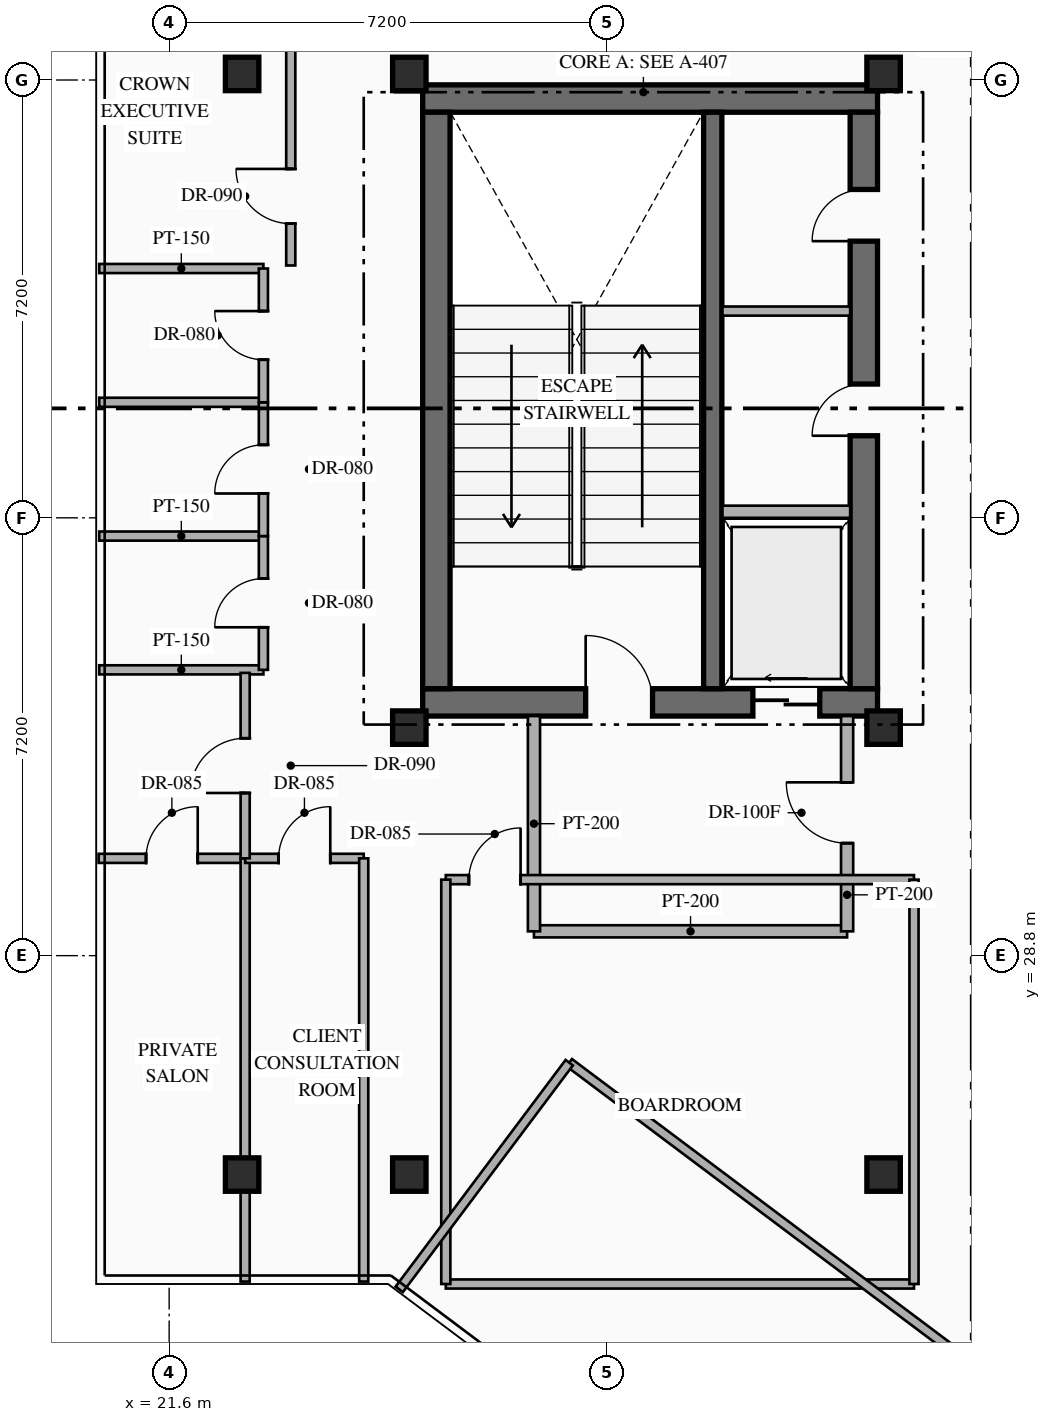
"""IFC4 building model, lengths in metres.
Left out: names, types, materials, properties, quantities, classifications, styles, units other than length and angle.
Written with IfcOpenShell. Run it as: python <this file> out.ifc"""

import sys

from ifc_helpers import new_model, si_unit, direction, frame, frame_2d, origin, origin_2d, place, context, subcontext, project, spatial, rectangle, hollow_rectangle, extrude, element, fill, save


model = new_model("IFC4")
c1 = context("Model", 3, precision=1e-05, world=origin(), true_north=direction((0.0, 1.0)))
c2 = subcontext(c1, "Body", "Model", "MODEL_VIEW")
j1 = project(units=[si_unit("LENGTHUNIT", "METRE"), si_unit("PLANEANGLEUNIT", "RADIAN")], contexts=[c1])
p1 = place(None, origin())
s1 = spatial("IfcSite", under=j1, at=p1, CompositionType="ELEMENT")
p2 = place(p1, origin())
s2 = spatial("IfcBuilding", under=s1, at=p2, CompositionType="ELEMENT")
p3 = place(p2, frame((0.0, 0.0, 281.95)))
s3 = spatial("IfcBuildingStorey", under=s2, at=p3, CompositionType="ELEMENT", Elevation=281.95)
p4 = place(p3, frame((25.77, 32.965, 0.0), z_axis=(0.0, 0.0, 1.0), x_axis=(1.0, 0.0, 0.0)))
e1 = element("IfcWall", 1, at=p4, inside=s3, PredefinedType="SHEAR", context=c2, shape_type="SweptSolid", body=[
    extrude(rectangle(XDim=7.48, YDim=0.45, at=frame_2d((3.74, 0.0))), origin(), (0.0, 0.0, 1.0), 4.0),
])
p5 = place(p4, frame((2.68, 0.0, 0.0)))
e2 = element("IfcOpeningElement", 2, at=p5, cuts=e1, PredefinedType="OPENING", context=c2, shape_type="SweptSolid", body=[
    extrude(rectangle(XDim=1.1, YDim=2.2, at=frame_2d((0.55, 1.1))), frame((0.0, 0.235, 0.0), z_axis=(0.0, -1.0, 0.0), x_axis=(1.0, 0.0, 0.0)), (0.0, 0.0, 1.0), 0.47),
])
p6 = place(p4, frame((5.43, 0.0, 0.0)))
e3 = element("IfcOpeningElement", 3, at=p6, cuts=e1, PredefinedType="OPENING", context=c2, shape_type="SweptSolid", body=[
    extrude(rectangle(XDim=1.1, YDim=2.15, at=frame_2d((0.55, 1.075))), frame((0.0, 0.235, 0.0), z_axis=(0.0, -1.0, 0.0), x_axis=(1.0, 0.0, 0.0)), (0.0, 0.0, 1.0), 0.47),
])
p7 = place(p3, frame((25.77, 42.895, 0.0), z_axis=(0.0, 0.0, 1.0), x_axis=(1.0, 0.0, 0.0)))
e4 = element("IfcWall", 4, at=p7, inside=s3, PredefinedType="SHEAR", context=c2, shape_type="SweptSolid", body=[
    extrude(rectangle(XDim=7.48, YDim=0.45, at=frame_2d((3.74, 0.0))), origin(), (0.0, 0.0, 1.0), 4.0),
])
p8 = place(p3, frame((25.995, 33.19, 0.0), z_axis=(0.0, 0.0, 1.0), x_axis=(0.0, 1.0, 0.0)))
e5 = element("IfcWall", 5, at=p8, inside=s3, PredefinedType="SHEAR", context=c2, shape_type="SweptSolid", body=[
    extrude(rectangle(XDim=9.48, YDim=0.45, at=frame_2d((4.74, 0.0))), origin(), (0.0, 0.0, 1.0), 4.0),
])
p9 = place(p3, frame((33.025, 33.19, 0.0), z_axis=(0.0, 0.0, 1.0), x_axis=(0.0, 1.0, 0.0)))
e6 = element("IfcWall", 6, at=p9, inside=s3, PredefinedType="SHEAR", context=c2, shape_type="SweptSolid", body=[
    extrude(rectangle(XDim=9.48, YDim=0.45, at=frame_2d((4.74, 0.0))), origin(), (0.0, 0.0, 1.0), 4.0),
])
p10 = place(p9, frame((4.16, 0.0, 0.0)))
e7 = element("IfcOpeningElement", 7, at=p10, cuts=e6, PredefinedType="OPENING", context=c2, shape_type="SweptSolid", body=[
    extrude(rectangle(XDim=0.85, YDim=2.08, at=frame_2d((0.425, 1.04))), frame((0.0, 0.235, 0.0), z_axis=(0.0, -1.0, 0.0), x_axis=(1.0, 0.0, 0.0)), (0.0, 0.0, 1.0), 0.47),
])
p11 = place(p9, frame((7.36, 0.0, 0.0)))
e8 = element("IfcOpeningElement", 8, at=p11, cuts=e6, PredefinedType="OPENING", context=c2, shape_type="SweptSolid", body=[
    extrude(rectangle(XDim=0.85, YDim=2.08, at=frame_2d((0.425, 1.04))), frame((0.0, 0.235, 0.0), z_axis=(0.0, -1.0, 0.0), x_axis=(1.0, 0.0, 0.0)), (0.0, 0.0, 1.0), 0.47),
])
p12 = place(p3, frame((30.54, 33.19, 0.0), z_axis=(0.0, 0.0, 1.0), x_axis=(0.0, 1.0, 0.0)))
e9 = element("IfcWall", 9, at=p12, inside=s3, PredefinedType="SHEAR", context=c2, shape_type="SweptSolid", body=[
    extrude(rectangle(XDim=9.48, YDim=0.3, at=frame_2d((4.74, 0.0))), origin(), (0.0, 0.0, 1.0), 4.0),
])
for number, where, z_axis, x_axis in (
    (10, (25.55, 32.55, 0.0), (0.0, 0.0, 1.0), (1.0, 0.0, 0.0)),
    (11, (33.35, 32.55, 0.0), (0.0, 0.0, 1.0), (1.0, 0.0, 0.0)),
    (12, (25.55, 43.3, 0.0), (0.0, 0.0, 1.0), (1.0, 0.0, 0.0)),
    (13, (33.35, 43.3, 0.0), (0.0, 0.0, 1.0), (1.0, 0.0, 0.0)),
    (14, (25.55, 25.2, 0.0), (0.0, 0.0, 1.0), (1.0, 0.0, 0.0)),
    (15, (33.35, 25.2, 0.0), (0.0, 0.0, 1.0), (1.0, 0.0, 0.0)),
    (16, (22.8, 25.2, 0.0), (0.0, 0.0, 1.0), (1.0, 0.0, 0.0)),
    (17, (22.8, 43.3, 0.0), (0.0, 0.0, 1.0), (1.0, 0.0, 0.0)),
):
    element("IfcColumn", number, at=place(p3, frame(where, z_axis=z_axis, x_axis=x_axis)), inside=s3, PredefinedType="COLUMN", context=c2, shape_type="SweptSolid", body=[
        extrude(hollow_rectangle(XDim=0.55, YDim=0.55, WallThickness=0.022, at=origin_2d()), origin(), (0.0, 0.0, 1.0), 4.0),
    ])
p13 = place(p3, frame((30.7, 36.1, 0.0), z_axis=(0.0, 0.0, 1.0), x_axis=(1.0, 0.0, 0.0)))
e18 = element("IfcWall", 18, at=p13, inside=s3, PredefinedType="STANDARD", context=c2, shape_type="SweptSolid", body=[
    extrude(rectangle(XDim=2.1, YDim=0.2, at=frame_2d((1.05, 0.0))), origin(), (0.0, 0.0, 1.0), 3.75),
])
p14 = place(p3, frame((30.7, 39.4, 0.0), z_axis=(0.0, 0.0, 1.0), x_axis=(1.0, 0.0, 0.0)))
e19 = element("IfcWall", 19, at=p14, inside=s3, PredefinedType="PARTITIONING", context=c2, shape_type="SweptSolid", body=[
    extrude(rectangle(XDim=2.1, YDim=0.15, at=frame_2d((1.05, 0.0))), origin(), (0.0, 0.0, 1.0), 3.75),
])
p15 = place(p3, frame((27.6, 29.2, 0.0), z_axis=(0.0, 0.0, 1.0), x_axis=(1.0, 0.0, 0.0)))
e20 = element("IfcWall", 20, at=p15, inside=s3, PredefinedType="STANDARD", context=c2, shape_type="SweptSolid", body=[
    extrude(rectangle(XDim=5.15, YDim=0.2, at=frame_2d((2.575, 0.0))), origin(), (0.0, 0.0, 1.0), 3.75),
])
p16 = place(p3, frame((27.6, 29.2, 0.0), z_axis=(0.0, 0.0, 1.0), x_axis=(0.0, 1.0, 0.0)))
e21 = element("IfcWall", 21, at=p16, inside=s3, PredefinedType="STANDARD", context=c2, shape_type="SweptSolid", body=[
    extrude(rectangle(XDim=3.54, YDim=0.2, at=frame_2d((1.77, 0.0))), origin(), (0.0, 0.0, 1.0), 3.75),
])
p17 = place(p3, frame((32.75, 29.2, 0.0), z_axis=(0.0, 0.0, 1.0), x_axis=(0.0, 1.0, 0.0)))
e22 = element("IfcWall", 22, at=p17, inside=s3, PredefinedType="STANDARD", context=c2, shape_type="SweptSolid", body=[
    extrude(rectangle(XDim=3.54, YDim=0.2, at=frame_2d((1.77, 0.0))), origin(), (0.0, 0.0, 1.0), 3.75),
])
p18 = place(p17, frame((1.45, 0.0, 0.0)))
e23 = element("IfcOpeningElement", 23, at=p18, cuts=e22, PredefinedType="OPENING", context=c2, shape_type="SweptSolid", body=[
    extrude(rectangle(XDim=1.0, YDim=2.2, at=frame_2d((0.5, 1.1))), frame((0.0, 0.11, 0.0), z_axis=(0.0, -1.0, 0.0), x_axis=(1.0, 0.0, 0.0)), (0.0, 0.0, 1.0), 0.22),
])
for number, where, z_axis, x_axis in (
    (24, (20.45, 33.5, 0.0), (0.0, 0.0, 1.0), (1.0, 0.0, 0.0)),
    (25, (20.45, 40.1, 0.0), (0.0, 0.0, 1.0), (1.0, 0.0, 0.0)),
    (26, (20.45, 35.7, 0.0), (0.0, 0.0, 1.0), (1.0, 0.0, 0.0)),
    (27, (20.45, 37.9, 0.0), (0.0, 0.0, 1.0), (1.0, 0.0, 0.0)),
):
    element("IfcWall", number, at=place(p3, frame(where, z_axis=z_axis, x_axis=x_axis)), inside=s3, PredefinedType="PARTITIONING", context=c2, shape_type="SweptSolid", body=[
        extrude(rectangle(XDim=2.7, YDim=0.15, at=frame_2d((1.35, 0.0))), origin(), (0.0, 0.0, 1.0), 3.75),
    ])
p19 = place(p3, frame((23.15, 33.5, 0.0), z_axis=(0.0, 0.0, 1.0), x_axis=(0.0, 1.0, 0.0)))
e28 = element("IfcWall", 28, at=p19, inside=s3, PredefinedType="PARTITIONING", context=c2, shape_type="SweptSolid", body=[
    extrude(rectangle(XDim=2.2, YDim=0.15, at=frame_2d((1.1, 0.0))), origin(), (0.0, 0.0, 1.0), 3.75),
])
p20 = place(p19, frame((0.7, 0.0, 0.0)))
e29 = element("IfcOpeningElement", 29, at=p20, cuts=e28, PredefinedType="OPENING", context=c2, shape_type="SweptSolid", body=[
    extrude(rectangle(XDim=0.8, YDim=2.06, at=frame_2d((0.4, 1.03))), frame((0.0, 0.085, 0.0), z_axis=(0.0, -1.0, 0.0), x_axis=(1.0, 0.0, 0.0)), (0.0, 0.0, 1.0), 0.17),
])
p21 = place(p3, frame((23.15, 35.7, 0.0), z_axis=(0.0, 0.0, 1.0), x_axis=(0.0, 1.0, 0.0)))
e30 = element("IfcWall", 30, at=p21, inside=s3, PredefinedType="PARTITIONING", context=c2, shape_type="SweptSolid", body=[
    extrude(rectangle(XDim=2.2, YDim=0.15, at=frame_2d((1.1, 0.0))), origin(), (0.0, 0.0, 1.0), 3.75),
])
p22 = place(p21, frame((0.7, 0.0, 0.0)))
e31 = element("IfcOpeningElement", 31, at=p22, cuts=e30, PredefinedType="OPENING", context=c2, shape_type="SweptSolid", body=[
    extrude(rectangle(XDim=0.8, YDim=2.06, at=frame_2d((0.4, 1.03))), frame((0.0, 0.085, 0.0), z_axis=(0.0, -1.0, 0.0), x_axis=(1.0, 0.0, 0.0)), (0.0, 0.0, 1.0), 0.17),
])
p23 = place(p3, frame((23.15, 37.9, 0.0), z_axis=(0.0, 0.0, 1.0), x_axis=(0.0, 1.0, 0.0)))
e32 = element("IfcWall", 32, at=p23, inside=s3, PredefinedType="PARTITIONING", context=c2, shape_type="SweptSolid", body=[
    extrude(rectangle(XDim=2.2, YDim=0.15, at=frame_2d((1.1, 0.0))), origin(), (0.0, 0.0, 1.0), 3.75),
])
p24 = place(p23, frame((0.7, 0.0, 0.0)))
e33 = element("IfcOpeningElement", 33, at=p24, cuts=e32, PredefinedType="OPENING", context=c2, shape_type="SweptSolid", body=[
    extrude(rectangle(XDim=0.8, YDim=2.06, at=frame_2d((0.4, 1.03))), frame((0.0, 0.085, 0.0), z_axis=(0.0, -1.0, 0.0), x_axis=(1.0, 0.0, 0.0)), (0.0, 0.0, 1.0), 0.17),
])
p25 = place(p3, frame((26.15, 23.4, 0.0), z_axis=(0.0, 0.0, 1.0), x_axis=(1.0, 0.0, 0.0)))
e34 = element("IfcWall", 34, at=p25, inside=s3, PredefinedType="PARTITIONING", context=c2, shape_type="SweptSolid", body=[
    extrude(rectangle(XDim=7.7, YDim=0.15, at=frame_2d((3.85, 0.0))), origin(), (0.0, 0.0, 1.0), 3.75),
])
p26 = place(p3, frame((26.15, 30.05, 0.0), z_axis=(0.0, 0.0, 1.0), x_axis=(1.0, 0.0, 0.0)))
e35 = element("IfcWall", 35, at=p26, inside=s3, PredefinedType="PARTITIONING", context=c2, shape_type="SweptSolid", body=[
    extrude(rectangle(XDim=7.7, YDim=0.15, at=frame_2d((3.85, 0.0))), origin(), (0.0, 0.0, 1.0), 3.75),
])
p27 = place(p26, frame((0.38, 0.0, 0.0)))
e36 = element("IfcOpeningElement", 36, at=p27, cuts=e35, PredefinedType="OPENING", context=c2, shape_type="SweptSolid", body=[
    extrude(rectangle(XDim=0.85, YDim=2.08, at=frame_2d((0.425, 1.04))), frame((0.0, 0.085, 0.0), z_axis=(0.0, -1.0, 0.0), x_axis=(1.0, 0.0, 0.0)), (0.0, 0.0, 1.0), 0.17),
])
for number, where, z_axis, x_axis in (
    (37, (26.15, 23.4, 0.0), (0.0, 0.0, 1.0), (0.0, 1.0, 0.0)),
    (38, (33.85, 23.4, 0.0), (0.0, 0.0, 1.0), (0.0, 1.0, 0.0)),
):
    element("IfcWall", number, at=place(p3, frame(where, z_axis=z_axis, x_axis=x_axis)), inside=s3, PredefinedType="PARTITIONING", context=c2, shape_type="SweptSolid", body=[
        extrude(rectangle(XDim=6.65, YDim=0.15, at=frame_2d((3.325, 0.0))), origin(), (0.0, 0.0, 1.0), 3.75),
    ])
p28 = place(p3, frame((20.44, 30.4, 0.0), z_axis=(0.0, 0.0, 1.0), x_axis=(1.0, 0.0, 0.0)))
e39 = element("IfcWall", 39, at=p28, inside=s3, PredefinedType="PARTITIONING", context=c2, shape_type="SweptSolid", body=[
    extrude(rectangle(XDim=2.41, YDim=0.15, at=frame_2d((1.205, 0.0))), origin(), (0.0, 0.0, 1.0), 3.75),
])
p29 = place(p28, frame((0.78, 0.0, 0.0)))
e40 = element("IfcOpeningElement", 40, at=p29, cuts=e39, PredefinedType="OPENING", context=c2, shape_type="SweptSolid", body=[
    extrude(rectangle(XDim=0.85, YDim=2.08, at=frame_2d((0.425, 1.04))), frame((0.0, 0.085, 0.0), z_axis=(0.0, -1.0, 0.0), x_axis=(1.0, 0.0, 0.0)), (0.0, 0.0, 1.0), 0.17),
])
p30 = place(p3, frame((22.85, 23.44, 0.0), z_axis=(0.0, 0.0, 1.0), x_axis=(0.0, 1.0, 0.0)))
e41 = element("IfcWall", 41, at=p30, inside=s3, PredefinedType="PARTITIONING", context=c2, shape_type="SweptSolid", body=[
    extrude(rectangle(XDim=6.96, YDim=0.15, at=frame_2d((3.48, 0.0))), origin(), (0.0, 0.0, 1.0), 3.295),
])
p31 = place(p3, frame((22.85, 30.4, 0.0), z_axis=(0.0, 0.0, 1.0), x_axis=(1.0, 0.0, 0.0)))
e42 = element("IfcWall", 42, at=p31, inside=s3, PredefinedType="PARTITIONING", context=c2, shape_type="SweptSolid", body=[
    extrude(rectangle(XDim=1.95, YDim=0.15, at=frame_2d((0.975, 0.0))), origin(), (0.0, 0.0, 1.0), 3.75),
])
p32 = place(p31, frame((0.55, 0.0, 0.0)))
e43 = element("IfcOpeningElement", 43, at=p32, cuts=e42, PredefinedType="OPENING", context=c2, shape_type="SweptSolid", body=[
    extrude(rectangle(XDim=0.85, YDim=2.08, at=frame_2d((0.425, 1.04))), frame((0.0, 0.085, 0.0), z_axis=(0.0, -1.0, 0.0), x_axis=(1.0, 0.0, 0.0)), (0.0, 0.0, 1.0), 0.17),
])
p33 = place(p3, frame((24.8, 23.44, 0.0), z_axis=(0.0, 0.0, 1.0), x_axis=(0.0, 1.0, 0.0)))
e44 = element("IfcWall", 44, at=p33, inside=s3, PredefinedType="PARTITIONING", context=c2, shape_type="SweptSolid", body=[
    extrude(rectangle(XDim=6.96, YDim=0.15, at=frame_2d((3.48, 0.0))), origin(), (0.0, 0.0, 1.0), 3.75),
])
p34 = place(p3, frame((22.85, 30.4, 0.0), z_axis=(0.0, 0.0, 1.0), x_axis=(0.0, 1.0, 0.0)))
e45 = element("IfcWall", 45, at=p34, inside=s3, PredefinedType="PARTITIONING", context=c2, shape_type="SweptSolid", body=[
    extrude(rectangle(XDim=3.05, YDim=0.15, at=frame_2d((1.525, 0.0))), origin(), (0.0, 0.0, 1.0), 3.295),
])
p35 = place(p34, frame((1.075, 0.0, 0.0)))
e46 = element("IfcOpeningElement", 46, at=p35, cuts=e45, PredefinedType="OPENING", context=c2, shape_type="SweptSolid", body=[
    extrude(rectangle(XDim=0.9, YDim=2.15, at=frame_2d((0.45, 1.075))), frame((0.0, 0.085, 0.0), z_axis=(0.0, -1.0, 0.0), x_axis=(1.0, 0.0, 0.0)), (0.0, 0.0, 1.0), 0.17),
])
p36 = place(p3, frame((23.6, 40.15, 0.0), z_axis=(0.0, 0.0, 1.0), x_axis=(0.0, 1.0, 0.0)))
e47 = element("IfcWall", 47, at=p36, inside=s3, PredefinedType="PARTITIONING", context=c2, shape_type="SweptSolid", body=[
    extrude(rectangle(XDim=7.81, YDim=0.15, at=frame_2d((3.905, 0.0))), origin(), (0.0, 0.0, 1.0), 3.75),
])
p37 = place(p36, frame((0.688, 0.0, 0.0)))
e48 = element("IfcOpeningElement", 48, at=p37, cuts=e47, PredefinedType="OPENING", context=c2, shape_type="SweptSolid", body=[
    extrude(rectangle(XDim=0.9, YDim=2.15, at=frame_2d((0.45, 1.075))), frame((0.0, 0.085, 0.0), z_axis=(0.0, -1.0, 0.0), x_axis=(1.0, 0.0, 0.0)), (0.0, 0.0, 1.0), 0.17),
])
p38 = place(p3, frame((28.18, 27.04, 0.0), z_axis=(0.0, 0.0, 1.0), x_axis=(0.80000367127, -0.599995104942, 0.0)))
e49 = element("IfcWall", 49, at=p38, inside=s3, PredefinedType="PARTITIONING", context=c2, shape_type="SweptSolid", body=[
    extrude(rectangle(XDim=15.96, YDim=0.15, at=frame_2d((7.98, 0.0))), origin(), (0.0, 0.0, 1.0), 3.75),
])
p39 = place(p38, frame((10.39, 0.0, 0.0)))
e50 = element("IfcOpeningElement", 50, at=p39, cuts=e49, PredefinedType="OPENING", context=c2, shape_type="SweptSolid", body=[
    extrude(rectangle(XDim=0.9, YDim=2.15, at=frame_2d((0.45, 1.075))), frame((0.0, 0.085, 0.0), z_axis=(0.0, -1.0, 0.0), x_axis=(1.0, 0.0, 0.0)), (0.0, 0.0, 1.0), 0.17),
])
p40 = place(p3, frame((25.384, 23.312, 0.0), z_axis=(0.0, 0.0, 1.0), x_axis=(0.599983234706, 0.800012573696, 0.0)))
e51 = element("IfcWall", 51, at=p40, inside=s3, PredefinedType="PARTITIONING", context=c2, shape_type="SweptSolid", body=[
    extrude(rectangle(XDim=4.66, YDim=0.15, at=frame_2d((2.33, 0.0))), origin(), (0.0, 0.0, 1.0), 3.75),
])
p41 = place(p5, origin())
e52 = element("IfcDoor", 52, at=p41, inside=s3, OperationType="SINGLE_SWING_LEFT", PredefinedType="DOOR", context=c2, shape_type="SweptSolid", body=[
    extrude(rectangle(XDim=1.1, YDim=2.2, at=frame_2d((0.55, 1.1))), frame((0.0, 0.025, 0.0), z_axis=(0.0, -1.0, 0.0), x_axis=(1.0, 0.0, 0.0)), (0.0, 0.0, 1.0), 0.05),
])
fill(e2, e52)
p42 = place(p6, origin())
e53 = element("IfcDoor", 53, at=p42, inside=s3, OperationType="SLIDING_TO_LEFT", PredefinedType="USERDEFINED", context=c2, shape_type="SweptSolid", body=[
    extrude(rectangle(XDim=1.1, YDim=2.15, at=frame_2d((0.55, 1.075))), frame((0.0, 0.025, 0.0), z_axis=(0.0, -1.0, 0.0), x_axis=(1.0, 0.0, 0.0)), (0.0, 0.0, 1.0), 0.05),
])
fill(e3, e53)
p43 = place(p10, origin())
e54 = element("IfcDoor", 54, at=p43, inside=s3, OperationType="SINGLE_SWING_LEFT", PredefinedType="DOOR", context=c2, shape_type="SweptSolid", body=[
    extrude(rectangle(XDim=0.85, YDim=2.08, at=frame_2d((0.425, 1.04))), frame((0.0, 0.025, 0.0), z_axis=(0.0, -1.0, 0.0), x_axis=(1.0, 0.0, 0.0)), (0.0, 0.0, 1.0), 0.05),
])
fill(e7, e54)
p44 = place(p11, origin())
e55 = element("IfcDoor", 55, at=p44, inside=s3, OperationType="SINGLE_SWING_LEFT", PredefinedType="DOOR", context=c2, shape_type="SweptSolid", body=[
    extrude(rectangle(XDim=0.85, YDim=2.08, at=frame_2d((0.425, 1.04))), frame((0.0, 0.025, 0.0), z_axis=(0.0, -1.0, 0.0), x_axis=(1.0, 0.0, 0.0)), (0.0, 0.0, 1.0), 0.05),
])
fill(e8, e55)
p45 = place(p18, origin())
e56 = element("IfcDoor", 56, at=p45, inside=s3, OperationType="SINGLE_SWING_RIGHT", PredefinedType="DOOR", context=c2, shape_type="SweptSolid", body=[
    extrude(rectangle(XDim=1.0, YDim=2.2, at=frame_2d((0.5, 1.1))), frame((0.0, 0.025, 0.0), z_axis=(0.0, -1.0, 0.0), x_axis=(1.0, 0.0, 0.0)), (0.0, 0.0, 1.0), 0.05),
])
fill(e23, e56)
p46 = place(p20, origin())
e57 = element("IfcDoor", 57, at=p46, inside=s3, OperationType="SINGLE_SWING_LEFT", PredefinedType="DOOR", context=c2, shape_type="SweptSolid", body=[
    extrude(rectangle(XDim=0.8, YDim=2.06, at=frame_2d((0.4, 1.03))), frame((0.0, 0.025, 0.0), z_axis=(0.0, -1.0, 0.0), x_axis=(1.0, 0.0, 0.0)), (0.0, 0.0, 1.0), 0.05),
])
fill(e29, e57)
p47 = place(p22, origin())
e58 = element("IfcDoor", 58, at=p47, inside=s3, OperationType="SINGLE_SWING_LEFT", PredefinedType="DOOR", context=c2, shape_type="SweptSolid", body=[
    extrude(rectangle(XDim=0.8, YDim=2.06, at=frame_2d((0.4, 1.03))), frame((0.0, 0.025, 0.0), z_axis=(0.0, -1.0, 0.0), x_axis=(1.0, 0.0, 0.0)), (0.0, 0.0, 1.0), 0.05),
])
fill(e31, e58)
p48 = place(p24, origin())
e59 = element("IfcDoor", 59, at=p48, inside=s3, OperationType="SINGLE_SWING_RIGHT", PredefinedType="DOOR", context=c2, shape_type="SweptSolid", body=[
    extrude(rectangle(XDim=0.8, YDim=2.06, at=frame_2d((0.4, 1.03))), frame((0.0, 0.025, 0.0), z_axis=(0.0, -1.0, 0.0), x_axis=(1.0, 0.0, 0.0)), (0.0, 0.0, 1.0), 0.05),
])
fill(e33, e59)
p49 = place(p27, origin())
e60 = element("IfcDoor", 60, at=p49, inside=s3, OperationType="SINGLE_SWING_RIGHT", PredefinedType="DOOR", context=c2, shape_type="SweptSolid", body=[
    extrude(rectangle(XDim=0.85, YDim=2.08, at=frame_2d((0.425, 1.04))), frame((0.0, 0.025, 0.0), z_axis=(0.0, -1.0, 0.0), x_axis=(1.0, 0.0, 0.0)), (0.0, 0.0, 1.0), 0.05),
])
fill(e36, e60)
p50 = place(p29, origin())
e61 = element("IfcDoor", 61, at=p50, inside=s3, OperationType="SINGLE_SWING_RIGHT", PredefinedType="DOOR", context=c2, shape_type="SweptSolid", body=[
    extrude(rectangle(XDim=0.85, YDim=2.08, at=frame_2d((0.425, 1.04))), frame((0.0, 0.025, 0.0), z_axis=(0.0, -1.0, 0.0), x_axis=(1.0, 0.0, 0.0)), (0.0, 0.0, 1.0), 0.05),
])
fill(e40, e61)
p51 = place(p32, origin())
e62 = element("IfcDoor", 62, at=p51, inside=s3, OperationType="SINGLE_SWING_RIGHT", PredefinedType="DOOR", context=c2, shape_type="SweptSolid", body=[
    extrude(rectangle(XDim=0.85, YDim=2.08, at=frame_2d((0.425, 1.04))), frame((0.0, 0.025, 0.0), z_axis=(0.0, -1.0, 0.0), x_axis=(1.0, 0.0, 0.0)), (0.0, 0.0, 1.0), 0.05),
])
fill(e43, e62)
p52 = place(p35, origin())
e63 = element("IfcDoor", 63, at=p52, inside=s3, OperationType="SINGLE_SWING_LEFT", PredefinedType="DOOR", context=c2, shape_type="SweptSolid", body=[
    extrude(rectangle(XDim=0.9, YDim=2.15, at=frame_2d((0.45, 1.075))), frame((0.0, 0.025, 0.0), z_axis=(0.0, -1.0, 0.0), x_axis=(1.0, 0.0, 0.0)), (0.0, 0.0, 1.0), 0.05),
])
fill(e46, e63)
p53 = place(p37, origin())
e64 = element("IfcDoor", 64, at=p53, inside=s3, OperationType="SINGLE_SWING_RIGHT", PredefinedType="DOOR", context=c2, shape_type="SweptSolid", body=[
    extrude(rectangle(XDim=0.9, YDim=2.15, at=frame_2d((0.45, 1.075))), frame((0.0, 0.025, 0.0), z_axis=(0.0, -1.0, 0.0), x_axis=(1.0, 0.0, 0.0)), (0.0, 0.0, 1.0), 0.05),
])
fill(e48, e64)
save(model, sys.argv[1])
